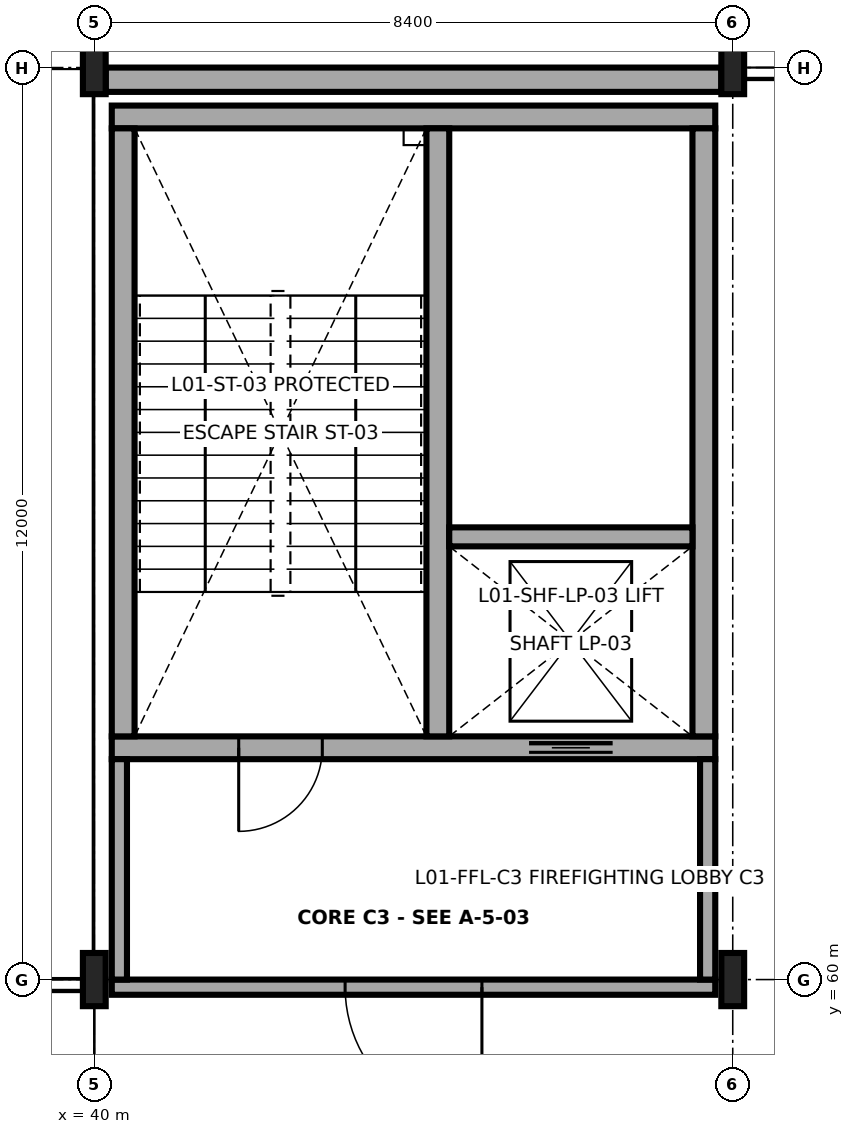
"""IFC4 building model, lengths in metres.
Left out: names, types, materials, properties, quantities, classifications, styles, units other than length and angle.
Written with IfcOpenShell. Run it as: python <this file> out.ifc"""

import sys

from ifc_helpers import new_model, si_unit, direction, frame, frame_2d, origin, origin_2d, place, context, subcontext, project, spatial, rectangle, i_section, extrude, element, fill, save


model = new_model("IFC4")
c1 = context("Model", 3, precision=1e-05, world=origin(), true_north=direction((0.0, 1.0)))
c2 = subcontext(c1, "Body", "Model", "MODEL_VIEW")
j1 = project(units=[si_unit("LENGTHUNIT", "METRE"), si_unit("PLANEANGLEUNIT", "RADIAN")], contexts=[c1])
p1 = place(None, origin())
s1 = spatial("IfcSite", under=j1, at=p1, CompositionType="ELEMENT")
p2 = place(p1, origin())
s2 = spatial("IfcBuilding", under=s1, at=p2, CompositionType="ELEMENT")
p3 = place(p2, frame((0.0, 0.0, 8.4)))
s3 = spatial("IfcBuildingStorey", under=s2, at=p3, CompositionType="ELEMENT", Elevation=8.4)
for number, where, z_axis, x_axis in (
    (1, (40.0, 60.0, 0.0), (0.0, 0.0, 1.0), (1.0, 0.0, 0.0)),
    (2, (40.0, 72.0, 0.0), (0.0, 0.0, 1.0), (1.0, 0.0, 0.0)),
    (3, (48.4, 60.0, 0.0), (0.0, 0.0, 1.0), (1.0, 0.0, 0.0)),
    (4, (48.4, 72.0, 0.0), (0.0, 0.0, 1.0), (1.0, 0.0, 0.0)),
):
    element("IfcColumn", number, at=place(p3, frame(where, z_axis=z_axis, x_axis=x_axis)), inside=s3, PredefinedType="COLUMN", context=c2, shape_type="SweptSolid", body=[
        extrude(i_section(OverallWidth=0.3, OverallDepth=0.7, WebThickness=0.017, FlangeThickness=0.032, FilletRadius=0.027, at=origin_2d()), origin(), (0.0, 0.0, 1.0), 4.5),
    ])
p4 = place(p3, frame((48.25, 71.84, 0.0), z_axis=(0.0, 0.0, 1.0), x_axis=(-1.0, 0.0, 0.0)))
e5 = element("IfcWall", 5, at=p4, inside=s3, PredefinedType="SOLIDWALL", context=c2, shape_type="SweptSolid", body=[
    extrude(rectangle(XDim=8.1, YDim=0.32, at=frame_2d((4.05, 0.0))), origin(), (0.0, 0.0, 1.0), 3.88),
])
p5 = place(p3, frame((40.23, 63.05, 0.0), z_axis=(0.0, 0.0, 1.0), x_axis=(1.0, 0.0, 0.0)))
e6 = element("IfcWall", 6, at=p5, inside=s3, PredefinedType="SHEAR", context=c2, shape_type="SweptSolid", body=[
    extrude(rectangle(XDim=7.94, YDim=0.3, at=frame_2d((3.97, 0.0))), origin(), (0.0, 0.0, 1.0), 4.25),
])
p6 = place(p5, frame((1.67, 0.0, 0.0)))
e7 = element("IfcOpeningElement", 7, at=p6, cuts=e6, PredefinedType="OPENING", context=c2, shape_type="SweptSolid", body=[
    extrude(rectangle(XDim=1.1, YDim=2.2, at=frame_2d((0.55, 1.1))), frame((0.0, 0.16, 0.0), z_axis=(0.0, -1.0, 0.0), x_axis=(1.0, 0.0, 0.0)), (0.0, 0.0, 1.0), 0.32),
])
p7 = place(p5, frame((5.49, 0.0, 0.0)))
e8 = element("IfcOpeningElement", 8, at=p7, cuts=e6, PredefinedType="OPENING", context=c2, shape_type="SweptSolid", body=[
    extrude(rectangle(XDim=1.1, YDim=2.1, at=frame_2d((0.55, 1.05))), frame((0.0, 0.16, 0.0), z_axis=(0.0, -1.0, 0.0), x_axis=(1.0, 0.0, 0.0)), (0.0, 0.0, 1.0), 0.32),
])
p8 = place(p3, frame((48.17, 71.35, 0.0), z_axis=(0.0, 0.0, 1.0), x_axis=(-1.0, 0.0, 0.0)))
e9 = element("IfcWall", 9, at=p8, inside=s3, PredefinedType="SHEAR", context=c2, shape_type="SweptSolid", body=[
    extrude(rectangle(XDim=7.94, YDim=0.3, at=frame_2d((3.97, 0.0))), origin(), (0.0, 0.0, 1.0), 4.25),
])
for number, where, z_axis, x_axis in (
    (10, (40.38, 71.2, 0.0), (0.0, 0.0, 1.0), (0.0, -1.0, 0.0)),
    (11, (48.02, 63.2, 0.0), (0.0, 0.0, 1.0), (0.0, 1.0, 0.0)),
    (12, (44.52, 63.2, 0.0), (0.0, 0.0, 1.0), (0.0, 1.0, 0.0)),
):
    element("IfcWall", number, at=place(p3, frame(where, z_axis=z_axis, x_axis=x_axis)), inside=s3, PredefinedType="SHEAR", context=c2, shape_type="SweptSolid", body=[
        extrude(rectangle(XDim=8.0, YDim=0.3, at=frame_2d((4.0, 0.0))), origin(), (0.0, 0.0, 1.0), 4.25),
    ])
p9 = place(p3, frame((44.67, 65.825, 0.0), z_axis=(0.0, 0.0, 1.0), x_axis=(1.0, 0.0, 0.0)))
e13 = element("IfcWall", 13, at=p9, inside=s3, PredefinedType="SHEAR", context=c2, shape_type="SweptSolid", body=[
    extrude(rectangle(XDim=3.2, YDim=0.25, at=frame_2d((1.6, 0.0))), origin(), (0.0, 0.0, 1.0), 4.25),
])
p10 = place(p3, frame((48.17, 59.9, 0.0), z_axis=(0.0, 0.0, 1.0), x_axis=(-1.0, 0.0, 0.0)))
e14 = element("IfcWall", 14, at=p10, inside=s3, PredefinedType="SOLIDWALL", context=c2, shape_type="SweptSolid", body=[
    extrude(rectangle(XDim=7.94, YDim=0.2, at=frame_2d((3.97, 0.0))), origin(), (0.0, 0.0, 1.0), 3.532),
])
p11 = place(p10, frame((3.07, 0.0, 0.0)))
e15 = element("IfcOpeningElement", 15, at=p11, cuts=e14, PredefinedType="OPENING", context=c2, shape_type="SweptSolid", body=[
    extrude(rectangle(XDim=1.8, YDim=2.2, at=frame_2d((0.9, 1.1))), frame((0.0, 0.11, 0.0), z_axis=(0.0, -1.0, 0.0), x_axis=(1.0, 0.0, 0.0)), (0.0, 0.0, 1.0), 0.22),
])
for number, where, z_axis, x_axis in (
    (16, (40.33, 60.0, 0.0), (0.0, 0.0, 1.0), (0.0, 1.0, 0.0)),
    (17, (48.07, 62.9, 0.0), (0.0, 0.0, 1.0), (0.0, -1.0, 0.0)),
):
    element("IfcWall", number, at=place(p3, frame(where, z_axis=z_axis, x_axis=x_axis)), inside=s3, PredefinedType="SOLIDWALL", context=c2, shape_type="SweptSolid", body=[
        extrude(rectangle(XDim=2.9, YDim=0.2, at=frame_2d((1.45, 0.0))), origin(), (0.0, 0.0, 1.0), 3.902),
    ])
p12 = place(p6, origin())
e18 = element("IfcDoor", 18, at=p12, inside=s3, OperationType="SINGLE_SWING_RIGHT", PredefinedType="DOOR", context=c2, shape_type="SweptSolid", body=[
    extrude(rectangle(XDim=1.1, YDim=2.2, at=frame_2d((0.55, 1.1))), frame((0.0, 0.025, 0.0), z_axis=(0.0, -1.0, 0.0), x_axis=(1.0, 0.0, 0.0)), (0.0, 0.0, 1.0), 0.05),
])
fill(e7, e18)
p13 = place(p7, origin())
e19 = element("IfcDoor", 19, at=p13, inside=s3, OperationType="SLIDING_TO_LEFT", PredefinedType="DOOR", context=c2, shape_type="SweptSolid", body=[
    extrude(rectangle(XDim=1.1, YDim=2.1, at=frame_2d((0.55, 1.05))), frame((0.0, 0.025, 0.0), z_axis=(0.0, -1.0, 0.0), x_axis=(1.0, 0.0, 0.0)), (0.0, 0.0, 1.0), 0.05),
])
fill(e8, e19)
p14 = place(p11, origin())
e20 = element("IfcDoor", 20, at=p14, inside=s3, OperationType="DOUBLE_DOOR_SINGLE_SWING", PredefinedType="DOOR", context=c2, shape_type="SweptSolid", body=[
    extrude(rectangle(XDim=1.8, YDim=2.2, at=frame_2d((0.9, 1.1))), frame((0.0, 0.025, 0.0), z_axis=(0.0, -1.0, 0.0), x_axis=(1.0, 0.0, 0.0)), (0.0, 0.0, 1.0), 0.05),
])
fill(e15, e20)
save(model, sys.argv[1])
